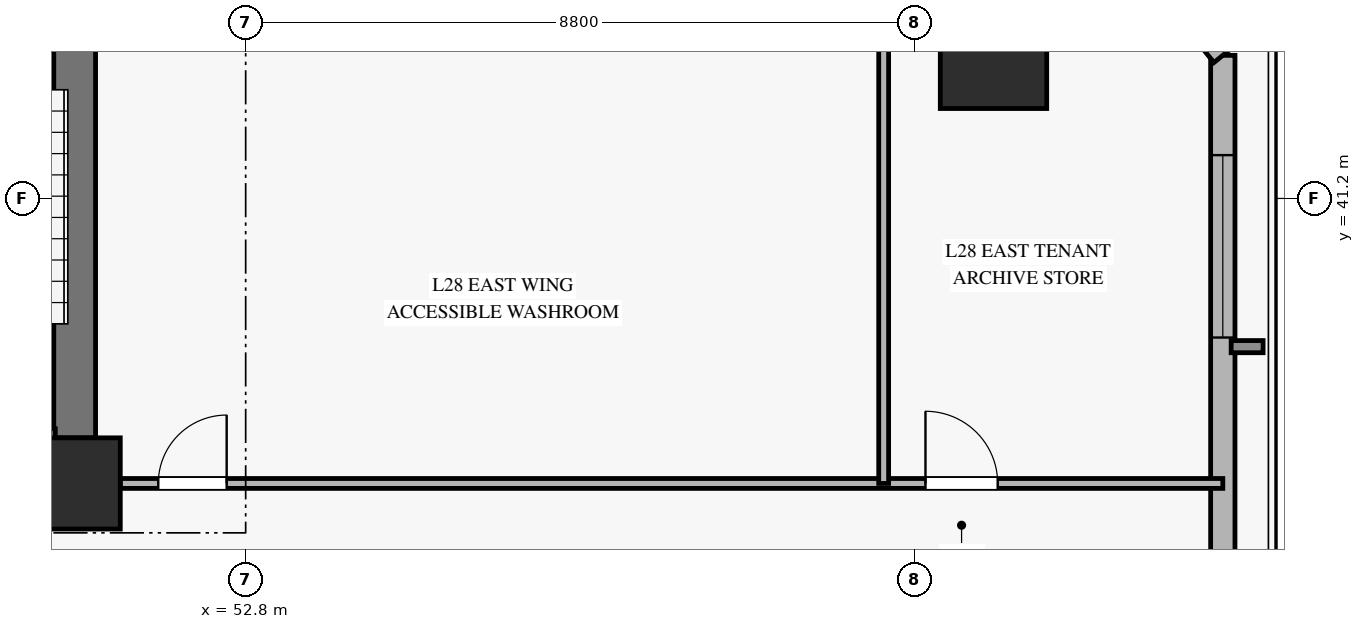
"""IFC4 building model, lengths in metres.
Left out: names, types, materials, properties, quantities, classifications, styles, units other than length and angle.
Written with IfcOpenShell. Run it as: python <this file> out.ifc"""

import sys

from ifc_helpers import new_model, si_unit, direction, frame, frame_2d, origin, origin_2d, place, context, subcontext, project, spatial, rectangle, hollow_rectangle, extrude, source, transform, mapped, element, fill, save


model = new_model("IFC4")
c1 = context("Model", 3, precision=1e-05, world=origin(), true_north=direction((0.0, 1.0)))
c2 = subcontext(c1, "Body", "Model", "MODEL_VIEW")
j1 = project(units=[si_unit("LENGTHUNIT", "METRE"), si_unit("PLANEANGLEUNIT", "RADIAN")], contexts=[c1])
p1 = place(None, origin())
s1 = spatial("IfcSite", under=j1, at=p1, CompositionType="ELEMENT")
p2 = place(p1, origin())
s2 = spatial("IfcBuilding", under=s1, at=p2, CompositionType="ELEMENT")
p3 = place(p2, frame((0.0, 0.0, 115.3)))
s3 = spatial("IfcBuildingStorey", under=s2, at=p3, CompositionType="ELEMENT", Elevation=115.3)
m1 = source(origin(), c2, "Body", "SweptSolid", [
    extrude(rectangle(XDim=1.2, YDim=1.2, at=origin_2d()), origin(), (0.0, 0.0, 1.0), 3.68),
])
p4 = place(p3, frame((50.55, 37.45, 0.0), z_axis=(0.0, 0.0, 1.0), x_axis=(1.0, 0.0, 0.0)))
e1 = element("IfcColumn", 1, at=p4, inside=s3, PredefinedType="PILASTER", context=c2, shape_type="MappedRepresentation", body=[
    mapped(m1, transform((0.0, 0.0, 0.0), x_axis=(1.0, 0.0, 0.0), y_axis=(0.0, 1.0, 0.0), z_axis=(0.0, 0.0, 1.0), scale=1.0)),
])
p5 = place(p3, frame((50.55, 38.05, 0.0), z_axis=(0.0, 0.0, 1.0), x_axis=(0.0, 1.0, 0.0)))
e2 = element("IfcWall", 2, at=p5, inside=s3, PredefinedType="SHEAR", context=c2, shape_type="SweptSolid", body=[
    extrude(rectangle(XDim=7.9, YDim=0.55, at=frame_2d((3.95, 0.0))), origin(), (0.0, 0.0, 1.0), 3.68),
])
m2 = source(origin(), c2, "Body", "SweptSolid", [
    extrude(hollow_rectangle(XDim=1.4, YDim=1.4, WallThickness=0.065, at=origin_2d()), origin(), (0.0, 0.0, 1.0), 3.68),
])
p6 = place(p3, frame((62.639, 43.083, 0.0), z_axis=(0.0, 0.0, 1.0), x_axis=(1.0, 0.0, 0.0)))
e3 = element("IfcColumn", 3, at=p6, inside=s3, PredefinedType="COLUMN", context=c2, shape_type="MappedRepresentation", body=[
    mapped(m2, transform((0.0, 0.0, 0.0), x_axis=(1.0, 0.0, 0.0), y_axis=(0.0, 1.0, 0.0), z_axis=(0.0, 0.0, 1.0), scale=1.0)),
])
p7 = place(p3, frame((65.656, 26.995, 0.0), z_axis=(0.0, 0.0, 1.0), x_axis=(0.0, 1.0, 0.0)))
e4 = element("IfcWall", 4, at=p7, inside=s3, PredefinedType="SOLIDWALL", context=c2, shape_type="SweptSolid", body=[
    extrude(rectangle(XDim=16.088, YDim=0.32, at=frame_2d((8.044, 0.0))), origin(), (0.0, 0.0, 1.0), 3.16),
])
p8 = place(p7, frame((1.22, 0.0, 0.45)))
e5 = element("IfcOpeningElement", 5, at=p8, cuts=e4, PredefinedType="OPENING", context=c2, shape_type="SweptSolid", body=[
    extrude(rectangle(XDim=2.4, YDim=2.1, at=frame_2d((1.2, 1.05))), frame((0.0, 0.17, 0.0), z_axis=(0.0, -1.0, 0.0), x_axis=(1.0, 0.0, 0.0)), (0.0, 0.0, 1.0), 0.34),
])
p9 = place(p7, frame((12.375, 0.0, 0.45)))
e6 = element("IfcOpeningElement", 6, at=p9, cuts=e4, PredefinedType="OPENING", context=c2, shape_type="SweptSolid", body=[
    extrude(rectangle(XDim=2.4, YDim=2.1, at=frame_2d((1.2, 1.05))), frame((0.0, 0.17, 0.0), z_axis=(0.0, -1.0, 0.0), x_axis=(1.0, 0.0, 0.0)), (0.0, 0.0, 1.0), 0.34),
])
p10 = place(p3, frame((65.656, 43.083, 0.0), z_axis=(0.0, 0.0, 1.0), x_axis=(-0.629663274091, 0.776868174957, 0.0)))
e7 = element("IfcWall", 7, at=p10, inside=s3, PredefinedType="SOLIDWALL", context=c2, shape_type="SweptSolid", body=[
    extrude(rectangle(XDim=4.077, YDim=0.3, at=frame_2d((2.038, 0.0))), origin(), (0.0, 0.0, 1.0), 3.16),
])
p11 = place(p10, frame((1.238, 0.0, 0.45)))
e8 = element("IfcOpeningElement", 8, at=p11, cuts=e7, PredefinedType="OPENING", context=c2, shape_type="SweptSolid", body=[
    extrude(rectangle(XDim=1.6, YDim=2.0, at=frame_2d((0.8, 1.0))), frame((0.0, 0.16, 0.0), z_axis=(0.0, -1.0, 0.0), x_axis=(1.0, 0.0, 0.0)), (0.0, 0.0, 1.0), 0.32),
])
p12 = place(p3, frame((47.44, 38.07, 0.0), z_axis=(0.0, 0.0, 1.0), x_axis=(1.0, 0.0, 0.0)))
e9 = element("IfcWall", 9, at=p12, inside=s3, PredefinedType="SOLIDWALL", context=c2, shape_type="SweptSolid", body=[
    extrude(rectangle(XDim=2.855, YDim=0.2, at=frame_2d((1.427, 0.0))), origin(), (0.0, 0.0, 1.0), 3.9),
])
p13 = place(p3, frame((51.15, 37.45, 0.0), z_axis=(0.0, 0.0, 1.0), x_axis=(1.0, 0.0, 0.0)))
e10 = element("IfcWall", 10, at=p13, inside=s3, PredefinedType="PARTITIONING", context=c2, shape_type="SweptSolid", body=[
    extrude(rectangle(XDim=14.506, YDim=0.13, at=frame_2d((7.253, 0.0))), origin(), (0.0, 0.0, 1.0), 3.165),
])
p14 = place(p13, frame((0.5, 0.0, 0.0)))
e11 = element("IfcOpeningElement", 11, at=p14, cuts=e10, PredefinedType="OPENING", context=c2, shape_type="SweptSolid", body=[
    extrude(rectangle(XDim=0.9, YDim=2.1, at=frame_2d((0.45, 1.05))), frame((0.0, 0.075, 0.0), z_axis=(0.0, -1.0, 0.0), x_axis=(1.0, 0.0, 0.0)), (0.0, 0.0, 1.0), 0.15),
])
p15 = place(p13, frame((10.594, 0.0, 0.0)))
e12 = element("IfcOpeningElement", 12, at=p15, cuts=e10, PredefinedType="OPENING", context=c2, shape_type="SweptSolid", body=[
    extrude(rectangle(XDim=0.95, YDim=2.1, at=frame_2d((0.475, 1.05))), frame((0.0, 0.075, 0.0), z_axis=(0.0, -1.0, 0.0), x_axis=(1.0, 0.0, 0.0)), (0.0, 0.0, 1.0), 0.15),
])
p16 = place(p3, frame((61.194, 37.45, 0.0), z_axis=(0.0, 0.0, 1.0), x_axis=(0.0, 1.0, 0.0)))
e13 = element("IfcWall", 13, at=p16, inside=s3, PredefinedType="PARTITIONING", context=c2, shape_type="SweptSolid", body=[
    extrude(rectangle(XDim=8.8, YDim=0.13, at=frame_2d((4.4, 0.0))), origin(), (0.0, 0.0, 1.0), 3.68),
])
m3 = source(origin(), c2, "Body", "SweptSolid", [
    extrude(rectangle(XDim=2.4, YDim=2.1, at=frame_2d((1.2, 1.05))), frame((0.0, 0.03, 0.0), z_axis=(0.0, -1.0, 0.0), x_axis=(1.0, 0.0, 0.0)), (0.0, 0.0, 1.0), 0.06),
])
p17 = place(p9, origin())
e14 = element("IfcWindow", 14, at=p17, inside=s3, PartitioningType="SINGLE_PANEL", PredefinedType="WINDOW", context=c2, shape_type="MappedRepresentation", body=[
    mapped(m3, transform((0.0, 0.0, 0.0), x_axis=(1.0, 0.0, 0.0), y_axis=(0.0, 1.0, 0.0), z_axis=(0.0, 0.0, 1.0), scale=1.0)),
])
fill(e6, e14)
m4 = source(origin(), c2, "Body", "SweptSolid", [
    extrude(rectangle(XDim=0.9, YDim=2.1, at=frame_2d((0.45, 1.05))), frame((0.0, 0.025, 0.0), z_axis=(0.0, -1.0, 0.0), x_axis=(1.0, 0.0, 0.0)), (0.0, 0.0, 1.0), 0.05),
])
p18 = place(p14, origin())
e15 = element("IfcDoor", 15, at=p18, inside=s3, OperationType="SINGLE_SWING_RIGHT", PredefinedType="DOOR", context=c2, shape_type="MappedRepresentation", body=[
    mapped(m4, transform((0.0, 0.0, 0.0), x_axis=(1.0, 0.0, 0.0), y_axis=(0.0, 1.0, 0.0), z_axis=(0.0, 0.0, 1.0), scale=1.0)),
])
fill(e11, e15)
m5 = source(origin(), c2, "Body", "SweptSolid", [
    extrude(rectangle(XDim=0.95, YDim=2.1, at=frame_2d((0.475, 1.05))), frame((0.0, 0.025, 0.0), z_axis=(0.0, -1.0, 0.0), x_axis=(1.0, 0.0, 0.0)), (0.0, 0.0, 1.0), 0.05),
])
p19 = place(p15, origin())
e16 = element("IfcDoor", 16, at=p19, inside=s3, OperationType="SINGLE_SWING_LEFT", PredefinedType="DOOR", context=c2, shape_type="MappedRepresentation", body=[
    mapped(m5, transform((0.0, 0.0, 0.0), x_axis=(1.0, 0.0, 0.0), y_axis=(0.0, 1.0, 0.0), z_axis=(0.0, 0.0, 1.0), scale=1.0)),
])
fill(e12, e16)
save(model, sys.argv[1])
